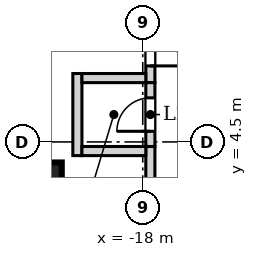
"""IFC4 building model, lengths in metres.
Left out: names, types, materials, properties, quantities, classifications, styles, units other than length and angle.
Written with IfcOpenShell. Run it as: python <this file> out.ifc"""

import sys

from ifc_helpers import new_model, si_unit, direction, frame, frame_2d, origin, origin_2d, place, context, subcontext, project, spatial, rectangle, extrude, element, fill, save


model = new_model("IFC4")
c1 = context("Model", 3, precision=1e-05, world=origin(), true_north=direction((0.0, 1.0)))
c2 = subcontext(c1, "Body", "Model", "MODEL_VIEW")
j1 = project(units=[si_unit("LENGTHUNIT", "METRE"), si_unit("PLANEANGLEUNIT", "RADIAN")], contexts=[c1])
p1 = place(None, origin())
s1 = spatial("IfcSite", under=j1, at=p1, CompositionType="ELEMENT")
p2 = place(p1, origin())
s2 = spatial("IfcBuilding", under=s1, at=p2, CompositionType="ELEMENT")
p3 = place(p2, frame((0.0, 0.0, 132.1)))
s3 = spatial("IfcBuildingStorey", under=s2, at=p3, CompositionType="ELEMENT", Elevation=132.1)
p4 = place(p3, frame((-21.19, 3.299, 0.0), z_axis=(0.0, 0.0, 1.0), x_axis=(1.0, 0.0, 0.0)))
e1 = element("IfcColumn", 1, at=p4, inside=s3, PredefinedType="COLUMN", context=c2, shape_type="SweptSolid", body=[
    extrude(rectangle(XDim=1.05, YDim=1.05, at=origin_2d()), origin(), (0.0, 0.0, 1.0), 5.4),
])
p5 = place(p3, frame((-17.75, 6.45, 0.0), z_axis=(0.0, 0.0, 1.0), x_axis=(0.0, 1.0, 0.0)))
e2 = element("IfcWall", 2, at=p5, inside=s3, PredefinedType="SOLIDWALL", context=c2, shape_type="SweptSolid", body=[
    extrude(rectangle(XDim=5.807, YDim=0.3, at=frame_2d((2.903, 0.0))), origin(), (0.0, 0.0, 1.0), 5.0),
])
p6 = place(p5, frame((0.55, 0.0, 0.0)))
e3 = element("IfcOpeningElement", 3, at=p6, cuts=e2, PredefinedType="OPENING", context=c2, shape_type="SweptSolid", body=[
    extrude(rectangle(XDim=2.0, YDim=2.1, at=frame_2d((1.0, 1.05))), frame((0.0, 0.16, 0.0), z_axis=(0.0, -1.0, 0.0), x_axis=(1.0, 0.0, 0.0)), (0.0, 0.0, 1.0), 0.32),
])
p7 = place(p3, frame((-17.75, 0.34, 0.0), z_axis=(0.0, 0.0, 1.0), x_axis=(0.0, 1.0, 0.0)))
e4 = element("IfcWall", 4, at=p7, inside=s3, PredefinedType="SOLIDWALL", context=c2, shape_type="SweptSolid", body=[
    extrude(rectangle(XDim=4.01, YDim=0.3, at=frame_2d((2.005, 0.0))), origin(), (0.0, 0.0, 1.0), 5.0),
])
p8 = place(p7, frame((1.46, 0.0, 0.0)))
e5 = element("IfcOpeningElement", 5, at=p8, cuts=e4, PredefinedType="OPENING", context=c2, shape_type="SweptSolid", body=[
    extrude(rectangle(XDim=1.2, YDim=2.1, at=frame_2d((0.6, 1.05))), frame((0.0, 0.16, 0.0), z_axis=(0.0, -1.0, 0.0), x_axis=(1.0, 0.0, 0.0)), (0.0, 0.0, 1.0), 0.32),
])
p9 = place(p3, frame((-20.15, 4.05, 0.0), z_axis=(0.0, 0.0, 1.0), x_axis=(0.0, 1.0, 0.0)))
e6 = element("IfcWall", 6, at=p9, inside=s3, PredefinedType="SOLIDWALL", context=c2, shape_type="SweptSolid", body=[
    extrude(rectangle(XDim=2.7, YDim=0.3, at=frame_2d((1.35, 0.0))), origin(), (0.0, 0.0, 1.0), 5.0),
])
p10 = place(p3, frame((-17.9, 4.2, 0.0), z_axis=(0.0, 0.0, 1.0), x_axis=(-1.0, 0.0, 0.0)))
e7 = element("IfcWall", 7, at=p10, inside=s3, PredefinedType="SOLIDWALL", context=c2, shape_type="SweptSolid", body=[
    extrude(rectangle(XDim=2.1, YDim=0.3, at=frame_2d((1.05, 0.0))), origin(), (0.0, 0.0, 1.0), 5.0),
])
p11 = place(p3, frame((-17.75, 4.35, 0.0), z_axis=(0.0, 0.0, 1.0), x_axis=(0.0, 1.0, 0.0)))
e8 = element("IfcWall", 8, at=p11, inside=s3, PredefinedType="SOLIDWALL", context=c2, shape_type="SweptSolid", body=[
    extrude(rectangle(XDim=2.1, YDim=0.3, at=frame_2d((1.05, 0.0))), origin(), (0.0, 0.0, 1.0), 5.0),
])
p12 = place(p11, frame((0.5, 0.0, 0.0)))
e9 = element("IfcOpeningElement", 9, at=p12, cuts=e8, PredefinedType="OPENING", context=c2, shape_type="SweptSolid", body=[
    extrude(rectangle(XDim=1.1, YDim=2.1, at=frame_2d((0.55, 1.05))), frame((0.0, 0.16, 0.0), z_axis=(0.0, -1.0, 0.0), x_axis=(1.0, 0.0, 0.0)), (0.0, 0.0, 1.0), 0.32),
])
p13 = place(p3, frame((-20.0, 6.6, 0.0), z_axis=(0.0, 0.0, 1.0), x_axis=(1.0, 0.0, 0.0)))
e10 = element("IfcWall", 10, at=p13, inside=s3, PredefinedType="SOLIDWALL", context=c2, shape_type="SweptSolid", body=[
    extrude(rectangle(XDim=2.1, YDim=0.3, at=frame_2d((1.05, 0.0))), origin(), (0.0, 0.0, 1.0), 5.0),
])
p14 = place(p12, origin())
e11 = element("IfcDoor", 11, at=p14, inside=s3, OperationType="SINGLE_SWING_LEFT", PredefinedType="DOOR", context=c2, shape_type="SweptSolid", body=[
    extrude(rectangle(XDim=1.1, YDim=2.1, at=frame_2d((0.55, 1.05))), frame((0.0, 0.025, 0.0), z_axis=(0.0, -1.0, 0.0), x_axis=(1.0, 0.0, 0.0)), (0.0, 0.0, 1.0), 0.05),
])
fill(e9, e11)
p15 = place(p6, frame((2.0, 0.0, 0.0), z_axis=(0.0, 0.0, 1.0), x_axis=(-1.0, 0.0, 0.0)))
e12 = element("IfcDoor", 12, at=p15, inside=s3, OperationType="DOUBLE_DOOR_SINGLE_SWING", PredefinedType="DOOR", context=c2, shape_type="SweptSolid", body=[
    extrude(rectangle(XDim=2.0, YDim=2.1, at=frame_2d((1.0, 1.05))), frame((0.0, 0.025, 0.0), z_axis=(0.0, -1.0, 0.0), x_axis=(1.0, 0.0, 0.0)), (0.0, 0.0, 1.0), 0.05),
])
fill(e3, e12)
save(model, sys.argv[1])
